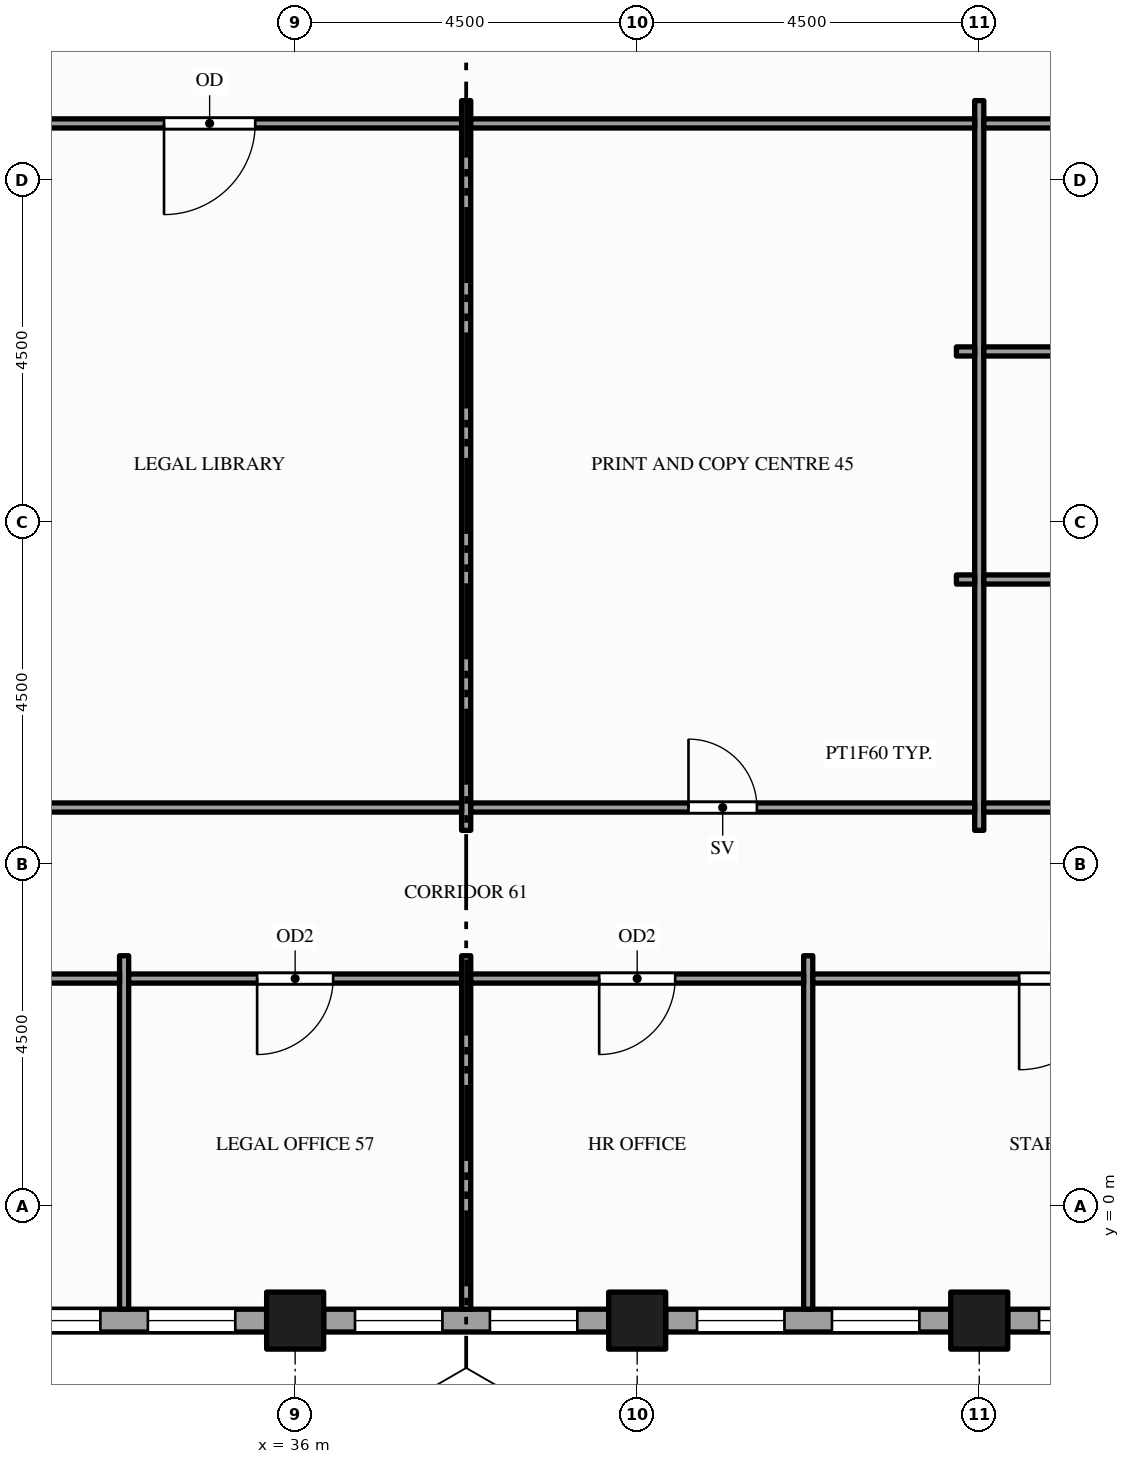
"""IFC4 building model, lengths in metres.
Left out: names, types, materials, properties, quantities, classifications, styles, units other than length and angle.
Written with IfcOpenShell. Run it as: python <this file> out.ifc"""

import sys

from ifc_helpers import new_model, si_unit, direction, frame, frame_2d, origin, origin_2d, place, context, subcontext, project, spatial, rectangle, hollow_rectangle, extrude, element, fill, save


model = new_model("IFC4")
c1 = context("Model", 3, precision=1e-05, world=origin(), true_north=direction((0.0, 1.0)))
c2 = subcontext(c1, "Body", "Model", "MODEL_VIEW")
j1 = project(units=[si_unit("LENGTHUNIT", "METRE"), si_unit("PLANEANGLEUNIT", "RADIAN")], contexts=[c1])
p1 = place(None, origin())
s1 = spatial("IfcSite", under=j1, at=p1, CompositionType="ELEMENT")
p2 = place(p1, origin())
s2 = spatial("IfcBuilding", under=s1, at=p2, CompositionType="ELEMENT")
p3 = place(p2, frame((0.0, 0.0, 215.0)))
s3 = spatial("IfcBuildingStorey", under=s2, at=p3, CompositionType="ELEMENT", Elevation=215.0)
for number, where, z_axis, x_axis in (
    (1, (36.0, -1.5, -0.15), (0.0, 0.0, 1.0), (1.0, 0.0, 0.0)),
    (2, (40.5, -1.5, -0.15), (0.0, 0.0, 1.0), (1.0, 0.0, 0.0)),
    (3, (45.0, -1.5, -0.15), (0.0, 0.0, 1.0), (1.0, 0.0, 0.0)),
):
    element("IfcColumn", number, at=place(p3, frame(where, z_axis=z_axis, x_axis=x_axis)), inside=s3, PredefinedType="COLUMN", context=c2, shape_type="SweptSolid", body=[
        extrude(hollow_rectangle(XDim=0.75, YDim=0.75, WallThickness=0.036, at=origin_2d()), origin(), (0.0, 0.0, 1.0), 4.0),
    ])
p4 = place(p3, frame((31.875, -1.5, 0.0), z_axis=(0.0, 0.0, 1.0), x_axis=(1.0, 0.0, 0.0)))
e4 = element("IfcWall", 4, at=p4, inside=s3, PredefinedType="STANDARD", context=c2, shape_type="SweptSolid", body=[
    extrude(rectangle(XDim=3.75, YDim=0.3, at=frame_2d((1.875, 0.0))), origin(), (0.0, 0.0, 1.0), 2.87),
])
p5 = place(p4, frame((0.413, 0.0, 0.9)))
e5 = element("IfcOpeningElement", 5, at=p5, cuts=e4, PredefinedType="OPENING", context=c2, shape_type="SweptSolid", body=[
    extrude(rectangle(XDim=1.15, YDim=1.75, at=frame_2d((0.575, 0.875))), frame((0.0, 0.16, 0.0), z_axis=(0.0, -1.0, 0.0), x_axis=(1.0, 0.0, 0.0)), (0.0, 0.0, 1.0), 0.32),
])
p6 = place(p4, frame((2.188, 0.0, 0.9)))
e6 = element("IfcOpeningElement", 6, at=p6, cuts=e4, PredefinedType="OPENING", context=c2, shape_type="SweptSolid", body=[
    extrude(rectangle(XDim=1.15, YDim=1.75, at=frame_2d((0.575, 0.875))), frame((0.0, 0.16, 0.0), z_axis=(0.0, -1.0, 0.0), x_axis=(1.0, 0.0, 0.0)), (0.0, 0.0, 1.0), 0.32),
])
p7 = place(p3, frame((36.375, -1.5, 0.0), z_axis=(0.0, 0.0, 1.0), x_axis=(1.0, 0.0, 0.0)))
e7 = element("IfcWall", 7, at=p7, inside=s3, PredefinedType="STANDARD", context=c2, shape_type="SweptSolid", body=[
    extrude(rectangle(XDim=3.75, YDim=0.3, at=frame_2d((1.875, 0.0))), origin(), (0.0, 0.0, 1.0), 2.87),
])
p8 = place(p7, frame((0.413, 0.0, 0.9)))
e8 = element("IfcOpeningElement", 8, at=p8, cuts=e7, PredefinedType="OPENING", context=c2, shape_type="SweptSolid", body=[
    extrude(rectangle(XDim=1.15, YDim=1.75, at=frame_2d((0.575, 0.875))), frame((0.0, 0.16, 0.0), z_axis=(0.0, -1.0, 0.0), x_axis=(1.0, 0.0, 0.0)), (0.0, 0.0, 1.0), 0.32),
])
p9 = place(p7, frame((2.188, 0.0, 0.9)))
e9 = element("IfcOpeningElement", 9, at=p9, cuts=e7, PredefinedType="OPENING", context=c2, shape_type="SweptSolid", body=[
    extrude(rectangle(XDim=1.15, YDim=1.75, at=frame_2d((0.575, 0.875))), frame((0.0, 0.16, 0.0), z_axis=(0.0, -1.0, 0.0), x_axis=(1.0, 0.0, 0.0)), (0.0, 0.0, 1.0), 0.32),
])
p10 = place(p3, frame((40.875, -1.5, 0.0), z_axis=(0.0, 0.0, 1.0), x_axis=(1.0, 0.0, 0.0)))
e10 = element("IfcWall", 10, at=p10, inside=s3, PredefinedType="STANDARD", context=c2, shape_type="SweptSolid", body=[
    extrude(rectangle(XDim=3.75, YDim=0.3, at=frame_2d((1.875, 0.0))), origin(), (0.0, 0.0, 1.0), 2.87),
])
p11 = place(p10, frame((0.413, 0.0, 0.9)))
e11 = element("IfcOpeningElement", 11, at=p11, cuts=e10, PredefinedType="OPENING", context=c2, shape_type="SweptSolid", body=[
    extrude(rectangle(XDim=1.15, YDim=1.75, at=frame_2d((0.575, 0.875))), frame((0.0, 0.16, 0.0), z_axis=(0.0, -1.0, 0.0), x_axis=(1.0, 0.0, 0.0)), (0.0, 0.0, 1.0), 0.32),
])
p12 = place(p10, frame((2.188, 0.0, 0.9)))
e12 = element("IfcOpeningElement", 12, at=p12, cuts=e10, PredefinedType="OPENING", context=c2, shape_type="SweptSolid", body=[
    extrude(rectangle(XDim=1.15, YDim=1.75, at=frame_2d((0.575, 0.875))), frame((0.0, 0.16, 0.0), z_axis=(0.0, -1.0, 0.0), x_axis=(1.0, 0.0, 0.0)), (0.0, 0.0, 1.0), 0.32),
])
p13 = place(p3, frame((45.375, -1.5, 0.0), z_axis=(0.0, 0.0, 1.0), x_axis=(1.0, 0.0, 0.0)))
e13 = element("IfcWall", 13, at=p13, inside=s3, PredefinedType="STANDARD", context=c2, shape_type="SweptSolid", body=[
    extrude(rectangle(XDim=3.75, YDim=0.3, at=frame_2d((1.875, 0.0))), origin(), (0.0, 0.0, 1.0), 2.87),
])
p14 = place(p13, frame((0.413, 0.0, 0.9)))
e14 = element("IfcOpeningElement", 14, at=p14, cuts=e13, PredefinedType="OPENING", context=c2, shape_type="SweptSolid", body=[
    extrude(rectangle(XDim=1.15, YDim=1.75, at=frame_2d((0.575, 0.875))), frame((0.0, 0.16, 0.0), z_axis=(0.0, -1.0, 0.0), x_axis=(1.0, 0.0, 0.0)), (0.0, 0.0, 1.0), 0.32),
])
p15 = place(p13, frame((2.188, 0.0, 0.9)))
e15 = element("IfcOpeningElement", 15, at=p15, cuts=e13, PredefinedType="OPENING", context=c2, shape_type="SweptSolid", body=[
    extrude(rectangle(XDim=1.15, YDim=1.75, at=frame_2d((0.575, 0.875))), frame((0.0, 0.16, 0.0), z_axis=(0.0, -1.0, 0.0), x_axis=(1.0, 0.0, 0.0)), (0.0, 0.0, 1.0), 0.32),
])
for number, where, z_axis, x_axis in (
    (16, (33.75, -1.35, 0.0), (0.0, 0.0, 1.0), (0.0, 1.0, 0.0)),
    (17, (38.25, -1.35, 0.0), (0.0, 0.0, 1.0), (0.0, 1.0, 0.0)),
):
    element("IfcWall", number, at=place(p3, frame(where, z_axis=z_axis, x_axis=x_axis)), inside=s3, PredefinedType="PARTITIONING", context=c2, shape_type="SweptSolid", body=[
        extrude(rectangle(XDim=4.65, YDim=0.12, at=frame_2d((2.325, 0.0))), origin(), (0.0, 0.0, 1.0), 2.87),
    ])
p16 = place(p3, frame((38.25, 4.95, 0.0), z_axis=(0.0, 0.0, 1.0), x_axis=(0.0, 1.0, 0.0)))
e18 = element("IfcWall", 18, at=p16, inside=s3, PredefinedType="PARTITIONING", context=c2, shape_type="SweptSolid", body=[
    extrude(rectangle(XDim=9.6, YDim=0.12, at=frame_2d((4.8, 0.0))), origin(), (0.0, 0.0, 1.0), 2.87),
])
p17 = place(p3, frame((42.75, -1.35, 0.0), z_axis=(0.0, 0.0, 1.0), x_axis=(0.0, 1.0, 0.0)))
e19 = element("IfcWall", 19, at=p17, inside=s3, PredefinedType="PARTITIONING", context=c2, shape_type="SweptSolid", body=[
    extrude(rectangle(XDim=4.65, YDim=0.12, at=frame_2d((2.325, 0.0))), origin(), (0.0, 0.0, 1.0), 2.87),
])
p18 = place(p3, frame((45.0, 4.95, 0.0), z_axis=(0.0, 0.0, 1.0), x_axis=(0.0, 1.0, 0.0)))
e20 = element("IfcWall", 20, at=p18, inside=s3, PredefinedType="PARTITIONING", context=c2, shape_type="SweptSolid", body=[
    extrude(rectangle(XDim=9.6, YDim=0.12, at=frame_2d((4.8, 0.0))), origin(), (0.0, 0.0, 1.0), 2.87),
])
p19 = place(p3, frame((29.31, 3.0, 0.0), z_axis=(0.0, 0.0, 1.0), x_axis=(1.0, 0.0, 0.0)))
e21 = element("IfcWall", 21, at=p19, inside=s3, PredefinedType="PARTITIONING", context=c2, shape_type="SweptSolid", body=[
    extrude(rectangle(XDim=4.38, YDim=0.12, at=frame_2d((2.19, 0.0))), origin(), (0.0, 0.0, 1.0), 2.87),
])
p20 = place(p19, frame((1.69, 0.0, 0.0)))
e22 = element("IfcOpeningElement", 22, at=p20, cuts=e21, PredefinedType="OPENING", context=c2, shape_type="SweptSolid", body=[
    extrude(rectangle(XDim=1.0, YDim=2.1, at=frame_2d((0.5, 1.05))), frame((0.0, 0.07, 0.0), z_axis=(0.0, -1.0, 0.0), x_axis=(1.0, 0.0, 0.0)), (0.0, 0.0, 1.0), 0.14),
])
p21 = place(p3, frame((33.81, 3.0, 0.0), z_axis=(0.0, 0.0, 1.0), x_axis=(1.0, 0.0, 0.0)))
e23 = element("IfcWall", 23, at=p21, inside=s3, PredefinedType="PARTITIONING", context=c2, shape_type="SweptSolid", body=[
    extrude(rectangle(XDim=4.38, YDim=0.12, at=frame_2d((2.19, 0.0))), origin(), (0.0, 0.0, 1.0), 2.87),
])
p22 = place(p21, frame((1.69, 0.0, 0.0)))
e24 = element("IfcOpeningElement", 24, at=p22, cuts=e23, PredefinedType="OPENING", context=c2, shape_type="SweptSolid", body=[
    extrude(rectangle(XDim=1.0, YDim=2.1, at=frame_2d((0.5, 1.05))), frame((0.0, 0.07, 0.0), z_axis=(0.0, -1.0, 0.0), x_axis=(1.0, 0.0, 0.0)), (0.0, 0.0, 1.0), 0.14),
])
p23 = place(p3, frame((38.31, 3.0, 0.0), z_axis=(0.0, 0.0, 1.0), x_axis=(1.0, 0.0, 0.0)))
e25 = element("IfcWall", 25, at=p23, inside=s3, PredefinedType="PARTITIONING", context=c2, shape_type="SweptSolid", body=[
    extrude(rectangle(XDim=4.38, YDim=0.12, at=frame_2d((2.19, 0.0))), origin(), (0.0, 0.0, 1.0), 2.87),
])
p24 = place(p23, frame((1.69, 0.0, 0.0)))
e26 = element("IfcOpeningElement", 26, at=p24, cuts=e25, PredefinedType="OPENING", context=c2, shape_type="SweptSolid", body=[
    extrude(rectangle(XDim=1.0, YDim=2.1, at=frame_2d((0.5, 1.05))), frame((0.0, 0.07, 0.0), z_axis=(0.0, -1.0, 0.0), x_axis=(1.0, 0.0, 0.0)), (0.0, 0.0, 1.0), 0.14),
])
p25 = place(p3, frame((42.81, 3.0, 0.0), z_axis=(0.0, 0.0, 1.0), x_axis=(1.0, 0.0, 0.0)))
e27 = element("IfcWall", 27, at=p25, inside=s3, PredefinedType="PARTITIONING", context=c2, shape_type="SweptSolid", body=[
    extrude(rectangle(XDim=6.63, YDim=0.12, at=frame_2d((3.315, 0.0))), origin(), (0.0, 0.0, 1.0), 2.87),
])
p26 = place(p25, frame((2.715, 0.0, 0.0)))
e28 = element("IfcOpeningElement", 28, at=p26, cuts=e27, PredefinedType="OPENING", context=c2, shape_type="SweptSolid", body=[
    extrude(rectangle(XDim=1.2, YDim=2.1, at=frame_2d((0.6, 1.05))), frame((0.0, 0.07, 0.0), z_axis=(0.0, -1.0, 0.0), x_axis=(1.0, 0.0, 0.0)), (0.0, 0.0, 1.0), 0.14),
])
p27 = place(p3, frame((31.56, 5.25, 0.0), z_axis=(0.0, 0.0, 1.0), x_axis=(1.0, 0.0, 0.0)))
e29 = element("IfcWall", 29, at=p27, inside=s3, PredefinedType="PARTITIONING", context=c2, shape_type="SweptSolid", body=[
    extrude(rectangle(XDim=6.63, YDim=0.12, at=frame_2d((3.315, 0.0))), origin(), (0.0, 0.0, 1.0), 2.87),
])
p28 = place(p3, frame((38.31, 5.25, 0.0), z_axis=(0.0, 0.0, 1.0), x_axis=(1.0, 0.0, 0.0)))
e30 = element("IfcWall", 30, at=p28, inside=s3, PredefinedType="PARTITIONING", context=c2, shape_type="SweptSolid", body=[
    extrude(rectangle(XDim=6.63, YDim=0.12, at=frame_2d((3.315, 0.0))), origin(), (0.0, 0.0, 1.0), 2.87),
])
p29 = place(p28, frame((2.865, 0.0, 0.0)))
e31 = element("IfcOpeningElement", 31, at=p29, cuts=e30, PredefinedType="OPENING", context=c2, shape_type="SweptSolid", body=[
    extrude(rectangle(XDim=0.9, YDim=2.1, at=frame_2d((0.45, 1.05))), frame((0.0, 0.07, 0.0), z_axis=(0.0, -1.0, 0.0), x_axis=(1.0, 0.0, 0.0)), (0.0, 0.0, 1.0), 0.14),
])
p30 = place(p3, frame((45.06, 5.25, 0.0), z_axis=(0.0, 0.0, 1.0), x_axis=(1.0, 0.0, 0.0)))
e32 = element("IfcWall", 32, at=p30, inside=s3, PredefinedType="PARTITIONING", context=c2, shape_type="SweptSolid", body=[
    extrude(rectangle(XDim=4.38, YDim=0.12, at=frame_2d((2.19, 0.0))), origin(), (0.0, 0.0, 1.0), 2.87),
])
p31 = place(p3, frame((44.7, 8.25, 0.0), z_axis=(0.0, 0.0, 1.0), x_axis=(1.0, 0.0, 0.0)))
e33 = element("IfcWall", 33, at=p31, inside=s3, PredefinedType="PARTITIONING", context=c2, shape_type="SweptSolid", body=[
    extrude(rectangle(XDim=0.24, YDim=0.12, at=frame_2d((0.12, 0.0))), origin(), (0.0, 0.0, 1.0), 2.87),
])
p32 = place(p3, frame((45.06, 8.25, 0.0), z_axis=(0.0, 0.0, 1.0), x_axis=(1.0, 0.0, 0.0)))
e34 = element("IfcWall", 34, at=p32, inside=s3, PredefinedType="PARTITIONING", context=c2, shape_type="SweptSolid", body=[
    extrude(rectangle(XDim=4.38, YDim=0.12, at=frame_2d((2.19, 0.0))), origin(), (0.0, 0.0, 1.0), 2.87),
])
p33 = place(p3, frame((44.7, 11.25, 0.0), z_axis=(0.0, 0.0, 1.0), x_axis=(1.0, 0.0, 0.0)))
e35 = element("IfcWall", 35, at=p33, inside=s3, PredefinedType="PARTITIONING", context=c2, shape_type="SweptSolid", body=[
    extrude(rectangle(XDim=0.24, YDim=0.12, at=frame_2d((0.12, 0.0))), origin(), (0.0, 0.0, 1.0), 2.87),
])
p34 = place(p3, frame((45.06, 11.25, 0.0), z_axis=(0.0, 0.0, 1.0), x_axis=(1.0, 0.0, 0.0)))
e36 = element("IfcWall", 36, at=p34, inside=s3, PredefinedType="PARTITIONING", context=c2, shape_type="SweptSolid", body=[
    extrude(rectangle(XDim=4.38, YDim=0.12, at=frame_2d((2.19, 0.0))), origin(), (0.0, 0.0, 1.0), 2.87),
])
p35 = place(p3, frame((31.56, 14.25, 0.0), z_axis=(0.0, 0.0, 1.0), x_axis=(1.0, 0.0, 0.0)))
e37 = element("IfcWall", 37, at=p35, inside=s3, PredefinedType="PARTITIONING", context=c2, shape_type="SweptSolid", body=[
    extrude(rectangle(XDim=6.63, YDim=0.12, at=frame_2d((3.315, 0.0))), origin(), (0.0, 0.0, 1.0), 2.87),
])
p36 = place(p35, frame((2.715, 0.0, 0.0)))
e38 = element("IfcOpeningElement", 38, at=p36, cuts=e37, PredefinedType="OPENING", context=c2, shape_type="SweptSolid", body=[
    extrude(rectangle(XDim=1.2, YDim=2.1, at=frame_2d((0.6, 1.05))), frame((0.0, 0.07, 0.0), z_axis=(0.0, -1.0, 0.0), x_axis=(1.0, 0.0, 0.0)), (0.0, 0.0, 1.0), 0.14),
])
p37 = place(p3, frame((38.31, 14.25, 0.0), z_axis=(0.0, 0.0, 1.0), x_axis=(1.0, 0.0, 0.0)))
e39 = element("IfcWall", 39, at=p37, inside=s3, PredefinedType="PARTITIONING", context=c2, shape_type="SweptSolid", body=[
    extrude(rectangle(XDim=6.63, YDim=0.12, at=frame_2d((3.315, 0.0))), origin(), (0.0, 0.0, 1.0), 2.87),
])
p38 = place(p3, frame((45.06, 14.25, 0.0), z_axis=(0.0, 0.0, 1.0), x_axis=(1.0, 0.0, 0.0)))
e40 = element("IfcWall", 40, at=p38, inside=s3, PredefinedType="PARTITIONING", context=c2, shape_type="SweptSolid", body=[
    extrude(rectangle(XDim=4.38, YDim=0.12, at=frame_2d((2.19, 0.0))), origin(), (0.0, 0.0, 1.0), 2.87),
])
p39 = place(p5, origin())
e41 = element("IfcWindow", 41, at=p39, inside=s3, PartitioningType="SINGLE_PANEL", PredefinedType="WINDOW", context=c2, shape_type="SweptSolid", body=[
    extrude(rectangle(XDim=1.15, YDim=1.75, at=frame_2d((0.575, 0.875))), frame((0.0, 0.03, 0.0), z_axis=(0.0, -1.0, 0.0), x_axis=(1.0, 0.0, 0.0)), (0.0, 0.0, 1.0), 0.06),
])
fill(e5, e41)
p40 = place(p6, origin())
e42 = element("IfcWindow", 42, at=p40, inside=s3, PartitioningType="SINGLE_PANEL", PredefinedType="WINDOW", context=c2, shape_type="SweptSolid", body=[
    extrude(rectangle(XDim=1.15, YDim=1.75, at=frame_2d((0.575, 0.875))), frame((0.0, 0.03, 0.0), z_axis=(0.0, -1.0, 0.0), x_axis=(1.0, 0.0, 0.0)), (0.0, 0.0, 1.0), 0.06),
])
fill(e6, e42)
p41 = place(p8, origin())
e43 = element("IfcWindow", 43, at=p41, inside=s3, PartitioningType="SINGLE_PANEL", PredefinedType="WINDOW", context=c2, shape_type="SweptSolid", body=[
    extrude(rectangle(XDim=1.15, YDim=1.75, at=frame_2d((0.575, 0.875))), frame((0.0, 0.03, 0.0), z_axis=(0.0, -1.0, 0.0), x_axis=(1.0, 0.0, 0.0)), (0.0, 0.0, 1.0), 0.06),
])
fill(e8, e43)
p42 = place(p9, origin())
e44 = element("IfcWindow", 44, at=p42, inside=s3, PartitioningType="SINGLE_PANEL", PredefinedType="WINDOW", context=c2, shape_type="SweptSolid", body=[
    extrude(rectangle(XDim=1.15, YDim=1.75, at=frame_2d((0.575, 0.875))), frame((0.0, 0.03, 0.0), z_axis=(0.0, -1.0, 0.0), x_axis=(1.0, 0.0, 0.0)), (0.0, 0.0, 1.0), 0.06),
])
fill(e9, e44)
p43 = place(p11, origin())
e45 = element("IfcWindow", 45, at=p43, inside=s3, PartitioningType="SINGLE_PANEL", PredefinedType="WINDOW", context=c2, shape_type="SweptSolid", body=[
    extrude(rectangle(XDim=1.15, YDim=1.75, at=frame_2d((0.575, 0.875))), frame((0.0, 0.03, 0.0), z_axis=(0.0, -1.0, 0.0), x_axis=(1.0, 0.0, 0.0)), (0.0, 0.0, 1.0), 0.06),
])
fill(e11, e45)
p44 = place(p12, origin())
e46 = element("IfcWindow", 46, at=p44, inside=s3, PartitioningType="SINGLE_PANEL", PredefinedType="WINDOW", context=c2, shape_type="SweptSolid", body=[
    extrude(rectangle(XDim=1.15, YDim=1.75, at=frame_2d((0.575, 0.875))), frame((0.0, 0.03, 0.0), z_axis=(0.0, -1.0, 0.0), x_axis=(1.0, 0.0, 0.0)), (0.0, 0.0, 1.0), 0.06),
])
fill(e12, e46)
p45 = place(p14, origin())
e47 = element("IfcWindow", 47, at=p45, inside=s3, PartitioningType="SINGLE_PANEL", PredefinedType="WINDOW", context=c2, shape_type="SweptSolid", body=[
    extrude(rectangle(XDim=1.15, YDim=1.75, at=frame_2d((0.575, 0.875))), frame((0.0, 0.03, 0.0), z_axis=(0.0, -1.0, 0.0), x_axis=(1.0, 0.0, 0.0)), (0.0, 0.0, 1.0), 0.06),
])
fill(e14, e47)
p46 = place(p36, origin())
e48 = element("IfcDoor", 48, at=p46, inside=s3, OperationType="SINGLE_SWING_LEFT", PredefinedType="DOOR", context=c2, shape_type="SweptSolid", body=[
    extrude(rectangle(XDim=1.2, YDim=2.1, at=frame_2d((0.6, 1.05))), frame((0.0, 0.025, 0.0), z_axis=(0.0, -1.0, 0.0), x_axis=(1.0, 0.0, 0.0)), (0.0, 0.0, 1.0), 0.05),
])
fill(e38, e48)
p47 = place(p29, origin())
e49 = element("IfcDoor", 49, at=p47, inside=s3, OperationType="SINGLE_SWING_LEFT", PredefinedType="DOOR", context=c2, shape_type="SweptSolid", body=[
    extrude(rectangle(XDim=0.9, YDim=2.1, at=frame_2d((0.45, 1.05))), frame((0.0, 0.025, 0.0), z_axis=(0.0, -1.0, 0.0), x_axis=(1.0, 0.0, 0.0)), (0.0, 0.0, 1.0), 0.05),
])
fill(e31, e49)
p48 = place(p22, origin())
e50 = element("IfcDoor", 50, at=p48, inside=s3, OperationType="SINGLE_SWING_LEFT", PredefinedType="DOOR", context=c2, shape_type="SweptSolid", body=[
    extrude(rectangle(XDim=1.0, YDim=2.1, at=frame_2d((0.5, 1.05))), frame((0.0, 0.025, 0.0), z_axis=(0.0, -1.0, 0.0), x_axis=(1.0, 0.0, 0.0)), (0.0, 0.0, 1.0), 0.05),
])
fill(e24, e50)
p49 = place(p24, origin())
e51 = element("IfcDoor", 51, at=p49, inside=s3, OperationType="SINGLE_SWING_LEFT", PredefinedType="DOOR", context=c2, shape_type="SweptSolid", body=[
    extrude(rectangle(XDim=1.0, YDim=2.1, at=frame_2d((0.5, 1.05))), frame((0.0, 0.025, 0.0), z_axis=(0.0, -1.0, 0.0), x_axis=(1.0, 0.0, 0.0)), (0.0, 0.0, 1.0), 0.05),
])
fill(e26, e51)
p50 = place(p26, origin())
e52 = element("IfcDoor", 52, at=p50, inside=s3, OperationType="SINGLE_SWING_LEFT", PredefinedType="DOOR", context=c2, shape_type="SweptSolid", body=[
    extrude(rectangle(XDim=1.2, YDim=2.1, at=frame_2d((0.6, 1.05))), frame((0.0, 0.025, 0.0), z_axis=(0.0, -1.0, 0.0), x_axis=(1.0, 0.0, 0.0)), (0.0, 0.0, 1.0), 0.05),
])
fill(e28, e52)
save(model, sys.argv[1])
